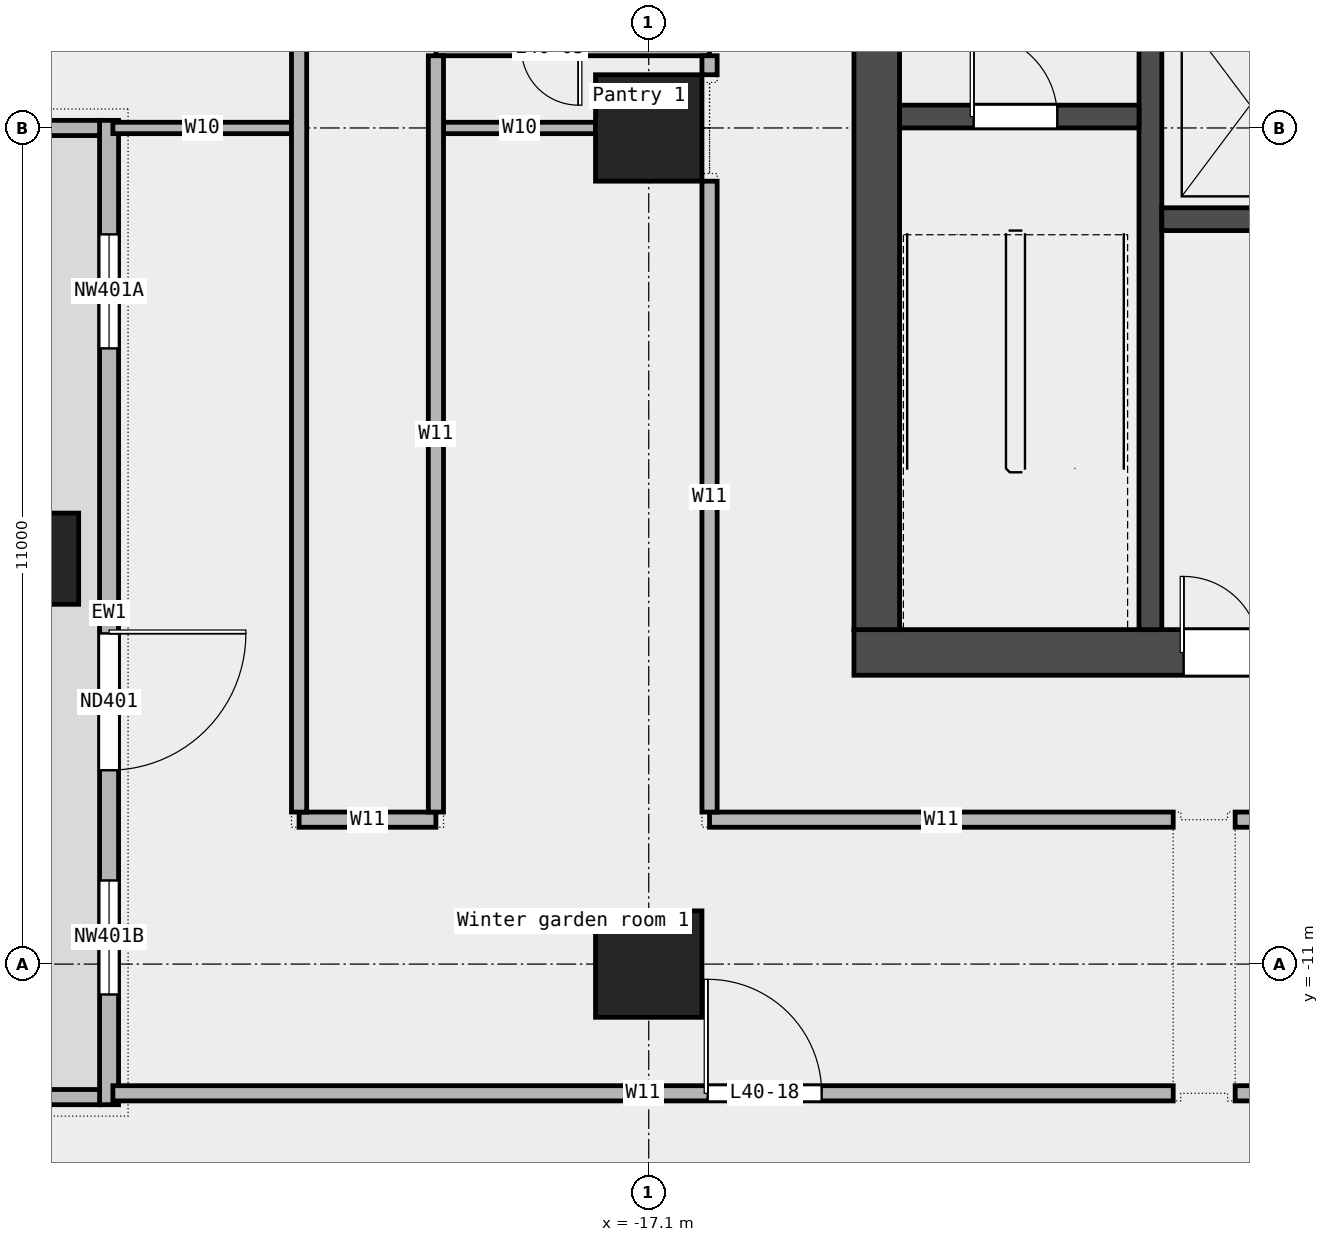
"""IFC4 building model, lengths in metres.
Left out: names, types, materials, properties, quantities, classifications, styles, units other than length and angle.
Written with IfcOpenShell. Run it as: python <this file> out.ifc"""

import sys

from ifc_helpers import new_model, si_unit, direction, frame, frame_2d, origin, origin_2d, place, context, subcontext, project, spatial, rectangle, extrude, element, fill, save


model = new_model("IFC4")
c1 = context("Model", 3, precision=1e-05, world=origin(), true_north=direction((0.0, 1.0)))
c2 = subcontext(c1, "Body", "Model", "MODEL_VIEW")
j1 = project(units=[si_unit("LENGTHUNIT", "METRE"), si_unit("PLANEANGLEUNIT", "RADIAN")], contexts=[c1])
p1 = place(None, origin())
s1 = spatial("IfcSite", under=j1, at=p1, CompositionType="ELEMENT")
p2 = place(p1, origin())
s2 = spatial("IfcBuilding", under=s1, at=p2, CompositionType="ELEMENT")
p3 = place(p2, frame((0.0, 0.0, 193.0)))
s3 = spatial("IfcBuildingStorey", under=s2, at=p3, CompositionType="ELEMENT", Elevation=193.0)
p4 = place(p3, frame((-25.2, -5.667, 0.0), z_axis=(0.0, 0.0, 1.0), x_axis=(1.0, 0.0, 0.0)))
e1 = element("IfcColumn", 1, at=p4, inside=s3, PredefinedType="COLUMN", context=c2, shape_type="SweptSolid", body=[
    extrude(rectangle(XDim=1.2, YDim=1.2, at=origin_2d()), origin(), (0.0, 0.0, 1.0), 3.6),
])
for number, where, z_axis, x_axis in (
    (2, (-17.1, -11.0, 0.0), (0.0, 0.0, 1.0), (1.0, 0.0, 0.0)),
    (3, (-17.1, 0.0, 0.0), (0.0, 0.0, 1.0), (1.0, 0.0, 0.0)),
):
    element("IfcColumn", number, at=place(p3, frame(where, z_axis=z_axis, x_axis=x_axis)), inside=s3, PredefinedType="COLUMN", context=c2, shape_type="SweptSolid", body=[
        extrude(rectangle(XDim=1.4, YDim=1.4, at=origin_2d()), origin(), (0.0, 0.0, 1.0), 3.6),
    ])
p5 = place(p3, frame((-24.2, 0.1, 0.0), z_axis=(0.0, 0.0, 1.0), x_axis=(0.0, -1.0, 0.0)))
e4 = element("IfcWall", 4, at=p5, inside=s3, PredefinedType="STANDARD", context=c2, shape_type="SweptSolid", body=[
    extrude(rectangle(XDim=12.95, YDim=0.25, at=frame_2d((6.475, 0.0))), origin(), (0.0, 0.0, 1.0), 3.6),
])
p6 = place(p5, frame((1.5, 0.0, 0.45)))
e5 = element("IfcOpeningElement", 5, at=p6, cuts=e4, PredefinedType="OPENING", context=c2, shape_type="SweptSolid", body=[
    extrude(rectangle(XDim=1.5, YDim=2.4, at=frame_2d((0.75, 1.2))), frame((0.0, 0.137, 0.0), z_axis=(0.0, -1.0, 0.0), x_axis=(1.0, 0.0, 0.0)), (0.0, 0.0, 1.0), 0.274),
])
p7 = place(p5, frame((6.75, 0.0, 0.0)))
e6 = element("IfcOpeningElement", 6, at=p7, cuts=e4, PredefinedType="OPENING", context=c2, shape_type="SweptSolid", body=[
    extrude(rectangle(XDim=1.8, YDim=2.4, at=frame_2d((0.9, 1.2))), frame((0.0, 0.137, 0.0), z_axis=(0.0, -1.0, 0.0), x_axis=(1.0, 0.0, 0.0)), (0.0, 0.0, 1.0), 0.274),
])
p8 = place(p5, frame((10.0, 0.0, 0.45)))
e7 = element("IfcOpeningElement", 7, at=p8, cuts=e4, PredefinedType="OPENING", context=c2, shape_type="SweptSolid", body=[
    extrude(rectangle(XDim=1.5, YDim=2.4, at=frame_2d((0.75, 1.2))), frame((0.0, 0.137, 0.0), z_axis=(0.0, -1.0, 0.0), x_axis=(1.0, 0.0, 0.0)), (0.0, 0.0, 1.0), 0.274),
])
for number, where, z_axis, x_axis in (
    (8, (-26.2, 0.0, 0.0), (0.0, 0.0, 1.0), (1.0, 0.0, 0.0)),
    (9, (-26.2, -12.75, 0.0), (0.0, 0.0, 1.0), (1.0, 0.0, 0.0)),
):
    element("IfcWall", number, at=place(p3, frame(where, z_axis=z_axis, x_axis=x_axis)), inside=s3, PredefinedType="STANDARD", context=c2, shape_type="SweptSolid", body=[
        extrude(rectangle(XDim=1.875, YDim=0.2, at=frame_2d((0.938, 0.0))), origin(), (0.0, 0.0, 1.0), 3.6),
    ])
p9 = place(p3, frame((-24.15, -12.7, 0.0), z_axis=(0.0, 0.0, 1.0), x_axis=(1.0, 0.0, 0.0)))
e10 = element("IfcWall", 10, at=p9, inside=s3, PredefinedType="PARTITIONING", context=c2, shape_type="SweptSolid", body=[
    extrude(rectangle(XDim=13.95, YDim=0.2, at=frame_2d((6.975, 0.0))), origin(), (0.0, 0.0, 1.0), 3.6),
])
p10 = place(p9, frame((7.825, 0.0, 0.0)))
e11 = element("IfcOpeningElement", 11, at=p10, cuts=e10, PredefinedType="OPENING", context=c2, shape_type="SweptSolid", body=[
    extrude(rectangle(XDim=1.5, YDim=2.1, at=frame_2d((0.75, 1.05))), frame((0.0, 0.112, 0.0), z_axis=(0.0, -1.0, 0.0), x_axis=(1.0, 0.0, 0.0)), (0.0, 0.0, 1.0), 0.224),
])
p11 = place(p3, frame((-9.385, -12.7, 0.0), z_axis=(0.0, 0.0, 1.0), x_axis=(1.0, 0.0, 0.0)))
e12 = element("IfcWall", 12, at=p11, inside=s3, PredefinedType="PARTITIONING", context=c2, shape_type="SweptSolid", body=[
    extrude(rectangle(XDim=12.425, YDim=0.2, at=frame_2d((6.212, 0.0))), origin(), (0.0, 0.0, 1.0), 3.6),
])
p12 = place(p3, frame((-21.7, -9.1, 0.0), z_axis=(0.0, 0.0, 1.0), x_axis=(1.0, 0.0, 0.0)))
e13 = element("IfcWall", 13, at=p12, inside=s3, PredefinedType="PARTITIONING", context=c2, shape_type="SweptSolid", body=[
    extrude(rectangle(XDim=1.8, YDim=0.2, at=frame_2d((0.9, 0.0))), origin(), (0.0, 0.0, 1.0), 3.6),
])
p13 = place(p3, frame((-16.3, -9.1, 0.0), z_axis=(0.0, 0.0, 1.0), x_axis=(1.0, 0.0, 0.0)))
e14 = element("IfcWall", 14, at=p13, inside=s3, PredefinedType="PARTITIONING", context=c2, shape_type="SweptSolid", body=[
    extrude(rectangle(XDim=6.1, YDim=0.2, at=frame_2d((3.05, 0.0))), origin(), (0.0, 0.0, 1.0), 3.6),
])
p14 = place(p3, frame((-9.385, -9.1, 0.0), z_axis=(0.0, 0.0, 1.0), x_axis=(1.0, 0.0, 0.0)))
e15 = element("IfcWall", 15, at=p14, inside=s3, PredefinedType="PARTITIONING", context=c2, shape_type="SweptSolid", body=[
    extrude(rectangle(XDim=12.425, YDim=0.2, at=frame_2d((6.212, 0.0))), origin(), (0.0, 0.0, 1.0), 3.6),
])
p15 = place(p14, frame((5.762, 0.0, 0.0)))
e16 = element("IfcOpeningElement", 16, at=p15, cuts=e15, PredefinedType="OPENING", context=c2, shape_type="SweptSolid", body=[
    extrude(rectangle(XDim=0.9, YDim=2.1, at=frame_2d((0.45, 1.05))), frame((0.0, 0.112, 0.0), z_axis=(0.0, -1.0, 0.0), x_axis=(1.0, 0.0, 0.0)), (0.0, 0.0, 1.0), 0.224),
])
p16 = place(p3, frame((-24.15, 0.0, 0.0), z_axis=(0.0, 0.0, 1.0), x_axis=(1.0, 0.0, 0.0)))
e17 = element("IfcWall", 17, at=p16, inside=s3, PredefinedType="PARTITIONING", context=c2, shape_type="SweptSolid", body=[
    extrude(rectangle(XDim=2.35, YDim=0.15, at=frame_2d((1.175, 0.0))), origin(), (0.0, 0.0, 1.0), 3.6),
])
p17 = place(p3, frame((-19.8, 0.0, 0.0), z_axis=(0.0, 0.0, 1.0), x_axis=(1.0, 0.0, 0.0)))
e18 = element("IfcWall", 18, at=p17, inside=s3, PredefinedType="PARTITIONING", context=c2, shape_type="SweptSolid", body=[
    extrude(rectangle(XDim=2.0, YDim=0.15, at=frame_2d((1.0, 0.0))), origin(), (0.0, 0.0, 1.0), 3.6),
])
p18 = place(p3, frame((-19.9, 1.05, 0.0), z_axis=(0.0, 0.0, 1.0), x_axis=(1.0, 0.0, 0.0)))
e19 = element("IfcWall", 19, at=p18, inside=s3, PredefinedType="PARTITIONING", context=c2, shape_type="SweptSolid", body=[
    extrude(rectangle(XDim=3.6, YDim=0.2, at=frame_2d((1.8, 0.0))), origin(), (0.0, 0.0, 1.0), 3.6),
])
p19 = place(p18, frame((1.125, 0.0, 0.0)))
e20 = element("IfcOpeningElement", 20, at=p19, cuts=e19, PredefinedType="OPENING", context=c2, shape_type="SweptSolid", body=[
    extrude(rectangle(XDim=0.75, YDim=2.1, at=frame_2d((0.375, 1.05))), frame((0.0, 0.112, 0.0), z_axis=(0.0, -1.0, 0.0), x_axis=(1.0, 0.0, 0.0)), (0.0, 0.0, 1.0), 0.224),
])
p20 = place(p3, frame((-21.7, -9.0, 0.0), z_axis=(0.0, 0.0, 1.0), x_axis=(0.0, 1.0, 0.0)))
e21 = element("IfcWall", 21, at=p20, inside=s3, PredefinedType="PARTITIONING", context=c2, shape_type="SweptSolid", body=[
    extrude(rectangle(XDim=24.3, YDim=0.2, at=frame_2d((12.15, 0.0))), origin(), (0.0, 0.0, 1.0), 3.6),
])
p21 = place(p20, frame((18.305, 0.0, 0.0)))
e22 = element("IfcOpeningElement", 22, at=p21, cuts=e21, PredefinedType="OPENING", context=c2, shape_type="SweptSolid", body=[
    extrude(rectangle(XDim=1.2, YDim=2.1, at=frame_2d((0.6, 1.05))), frame((0.0, 0.112, 0.0), z_axis=(0.0, -1.0, 0.0), x_axis=(1.0, 0.0, 0.0)), (0.0, 0.0, 1.0), 0.224),
])
p22 = place(p20, frame((10.805, 0.0, 0.0)))
e23 = element("IfcOpeningElement", 23, at=p22, cuts=e21, PredefinedType="OPENING", context=c2, shape_type="SweptSolid", body=[
    extrude(rectangle(XDim=0.9, YDim=2.1, at=frame_2d((0.45, 1.05))), frame((0.0, 0.112, 0.0), z_axis=(0.0, -1.0, 0.0), x_axis=(1.0, 0.0, 0.0)), (0.0, 0.0, 1.0), 0.224),
])
p23 = place(p3, frame((-19.9, -9.0, 0.0), z_axis=(0.0, 0.0, 1.0), x_axis=(0.0, 1.0, 0.0)))
e24 = element("IfcWall", 24, at=p23, inside=s3, PredefinedType="PARTITIONING", context=c2, shape_type="SweptSolid", body=[
    extrude(rectangle(XDim=9.95, YDim=0.2, at=frame_2d((4.975, 0.0))), origin(), (0.0, 0.0, 1.0), 3.6),
])
p24 = place(p3, frame((-16.3, -9.0, 0.0), z_axis=(0.0, 0.0, 1.0), x_axis=(0.0, 1.0, 0.0)))
e25 = element("IfcWall", 25, at=p24, inside=s3, PredefinedType="PARTITIONING", context=c2, shape_type="SweptSolid", body=[
    extrude(rectangle(XDim=8.3, YDim=0.2, at=frame_2d((4.15, 0.0))), origin(), (0.0, 0.0, 1.0), 3.6),
])
p25 = place(p3, frame((-16.3, 0.7, 0.0), z_axis=(0.0, 0.0, 1.0), x_axis=(0.0, 1.0, 0.0)))
e26 = element("IfcWall", 26, at=p25, inside=s3, PredefinedType="PARTITIONING", context=c2, shape_type="SweptSolid", body=[
    extrude(rectangle(XDim=0.25, YDim=0.2, at=frame_2d((0.125, 0.0))), origin(), (0.0, 0.0, 1.0), 3.6),
])
p26 = place(p3, frame((-14.4, -6.9, 0.0), z_axis=(0.0, 0.0, 1.0), x_axis=(1.0, 0.0, 0.0)))
e27 = element("IfcWall", 27, at=p26, inside=s3, PredefinedType="SHEAR", context=c2, shape_type="SweptSolid", body=[
    extrude(rectangle(XDim=28.8, YDim=0.6, at=frame_2d((14.4, 0.0))), origin(), (0.0, 0.0, 1.0), 3.7),
])
p27 = place(p26, frame((4.337, 0.0, 0.0)))
e28 = element("IfcOpeningElement", 28, at=p27, cuts=e27, PredefinedType="OPENING", context=c2, shape_type="SweptSolid", body=[
    extrude(rectangle(XDim=1.0, YDim=2.1, at=frame_2d((0.5, 1.05))), frame((0.0, 0.312, 0.0), z_axis=(0.0, -1.0, 0.0), x_axis=(1.0, 0.0, 0.0)), (0.0, 0.0, 1.0), 0.624),
])
p28 = place(p26, frame((6.212, 0.0, 0.0)))
e29 = element("IfcOpeningElement", 29, at=p28, cuts=e27, PredefinedType="OPENING", context=c2, shape_type="SweptSolid", body=[
    extrude(rectangle(XDim=1.0, YDim=2.1, at=frame_2d((0.5, 1.05))), frame((0.0, 0.312, 0.0), z_axis=(0.0, -1.0, 0.0), x_axis=(1.0, 0.0, 0.0)), (0.0, 0.0, 1.0), 0.624),
])
p29 = place(p26, frame((8.462, 0.0, 0.0)))
e30 = element("IfcOpeningElement", 30, at=p29, cuts=e27, PredefinedType="OPENING", context=c2, shape_type="SweptSolid", body=[
    extrude(rectangle(XDim=1.0, YDim=2.1, at=frame_2d((0.5, 1.05))), frame((0.0, 0.312, 0.0), z_axis=(0.0, -1.0, 0.0), x_axis=(1.0, 0.0, 0.0)), (0.0, 0.0, 1.0), 0.624),
])
p30 = place(p26, frame((13.05, 0.0, 0.0)))
e31 = element("IfcOpeningElement", 31, at=p30, cuts=e27, PredefinedType="OPENING", context=c2, shape_type="SweptSolid", body=[
    extrude(rectangle(XDim=1.2, YDim=2.1, at=frame_2d((0.6, 1.05))), frame((0.0, 0.312, 0.0), z_axis=(0.0, -1.0, 0.0), x_axis=(1.0, 0.0, 0.0)), (0.0, 0.0, 1.0), 0.624),
])
p31 = place(p26, frame((18.75, 0.0, 0.0)))
e32 = element("IfcOpeningElement", 32, at=p31, cuts=e27, PredefinedType="OPENING", context=c2, shape_type="SweptSolid", body=[
    extrude(rectangle(XDim=1.8, YDim=2.1, at=frame_2d((0.9, 1.05))), frame((0.0, 0.312, 0.0), z_axis=(0.0, -1.0, 0.0), x_axis=(1.0, 0.0, 0.0)), (0.0, 0.0, 1.0), 0.624),
])
p32 = place(p26, frame((23.087, 0.0, 0.0)))
e33 = element("IfcOpeningElement", 33, at=p32, cuts=e27, PredefinedType="OPENING", context=c2, shape_type="SweptSolid", body=[
    extrude(rectangle(XDim=1.0, YDim=2.1, at=frame_2d((0.5, 1.05))), frame((0.0, 0.312, 0.0), z_axis=(0.0, -1.0, 0.0), x_axis=(1.0, 0.0, 0.0)), (0.0, 0.0, 1.0), 0.624),
])
p33 = place(p3, frame((-14.1, -6.6, 0.0), z_axis=(0.0, 0.0, 1.0), x_axis=(0.0, 1.0, 0.0)))
e34 = element("IfcWall", 34, at=p33, inside=s3, PredefinedType="SHEAR", context=c2, shape_type="SweptSolid", body=[
    extrude(rectangle(XDim=19.5, YDim=0.6, at=frame_2d((9.75, 0.0))), origin(), (0.0, 0.0, 1.0), 3.7),
])
p34 = place(p33, frame((9.3, 0.0, 0.0)))
e35 = element("IfcOpeningElement", 35, at=p34, cuts=e34, PredefinedType="OPENING", context=c2, shape_type="SweptSolid", body=[
    extrude(rectangle(XDim=1.8, YDim=2.1, at=frame_2d((0.9, 1.05))), frame((0.0, 0.312, 0.0), z_axis=(0.0, -1.0, 0.0), x_axis=(1.0, 0.0, 0.0)), (0.0, 0.0, 1.0), 0.624),
])
p35 = place(p3, frame((-10.5, -6.6, 0.0), z_axis=(0.0, 0.0, 1.0), x_axis=(0.0, 1.0, 0.0)))
e36 = element("IfcWall", 36, at=p35, inside=s3, PredefinedType="SHEAR", context=c2, shape_type="SweptSolid", body=[
    extrude(rectangle(XDim=8.55, YDim=0.3, at=frame_2d((4.275, 0.0))), origin(), (0.0, 0.0, 1.0), 3.7),
])
p36 = place(p3, frame((-13.8, 0.15, 0.0), z_axis=(0.0, 0.0, 1.0), x_axis=(1.0, 0.0, 0.0)))
e37 = element("IfcWall", 37, at=p36, inside=s3, PredefinedType="SOLIDWALL", context=c2, shape_type="SweptSolid", body=[
    extrude(rectangle(XDim=3.15, YDim=0.3, at=frame_2d((1.575, 0.0))), origin(), (0.0, 0.0, 1.0), 3.7),
])
p37 = place(p36, frame((0.975, 0.0, 0.0)))
e38 = element("IfcOpeningElement", 38, at=p37, cuts=e37, PredefinedType="OPENING", context=c2, shape_type="SweptSolid", body=[
    extrude(rectangle(XDim=1.1, YDim=2.1, at=frame_2d((0.55, 1.05))), frame((0.0, 0.162, 0.0), z_axis=(0.0, -1.0, 0.0), x_axis=(1.0, 0.0, 0.0)), (0.0, 0.0, 1.0), 0.324),
])
p38 = place(p3, frame((-10.35, -1.2, 0.0), z_axis=(0.0, 0.0, 1.0), x_axis=(1.0, 0.0, 0.0)))
e39 = element("IfcWall", 39, at=p38, inside=s3, PredefinedType="SOLIDWALL", context=c2, shape_type="SweptSolid", body=[
    extrude(rectangle(XDim=20.7, YDim=0.3, at=frame_2d((10.35, 0.0))), origin(), (0.0, 0.0, 1.0), 3.7),
])
p39 = place(p6, origin())
e40 = element("IfcWindow", 40, at=p39, inside=s3, PartitioningType="SINGLE_PANEL", PredefinedType="WINDOW", context=c2, shape_type="SweptSolid", body=[
    extrude(rectangle(XDim=1.5, YDim=2.4, at=frame_2d((0.75, 1.2))), frame((0.0, 0.03, 0.0), z_axis=(0.0, -1.0, 0.0), x_axis=(1.0, 0.0, 0.0)), (0.0, 0.0, 1.0), 0.06),
])
fill(e5, e40)
p40 = place(p7, origin())
e41 = element("IfcDoor", 41, at=p40, inside=s3, OperationType="DOUBLE_DOOR_SINGLE_SWING", PredefinedType="DOOR", context=c2, shape_type="SweptSolid", body=[
    extrude(rectangle(XDim=1.8, YDim=2.4, at=frame_2d((0.9, 1.2))), frame((0.0, 0.025, 0.0), z_axis=(0.0, -1.0, 0.0), x_axis=(1.0, 0.0, 0.0)), (0.0, 0.0, 1.0), 0.05),
])
fill(e6, e41)
p41 = place(p8, origin())
e42 = element("IfcWindow", 42, at=p41, inside=s3, PartitioningType="SINGLE_PANEL", PredefinedType="WINDOW", context=c2, shape_type="SweptSolid", body=[
    extrude(rectangle(XDim=1.5, YDim=2.4, at=frame_2d((0.75, 1.2))), frame((0.0, 0.03, 0.0), z_axis=(0.0, -1.0, 0.0), x_axis=(1.0, 0.0, 0.0)), (0.0, 0.0, 1.0), 0.06),
])
fill(e7, e42)
p42 = place(p10, origin())
e43 = element("IfcDoor", 43, at=p42, inside=s3, OperationType="DOUBLE_DOOR_SINGLE_SWING", PredefinedType="DOOR", context=c2, shape_type="SweptSolid", body=[
    extrude(rectangle(XDim=1.5, YDim=2.1, at=frame_2d((0.75, 1.05))), frame((0.0, 0.025, 0.0), z_axis=(0.0, -1.0, 0.0), x_axis=(1.0, 0.0, 0.0)), (0.0, 0.0, 1.0), 0.05),
])
fill(e11, e43)
p43 = place(p37, origin())
e44 = element("IfcDoor", 44, at=p43, inside=s3, OperationType="SINGLE_SWING_LEFT", PredefinedType="DOOR", context=c2, shape_type="SweptSolid", body=[
    extrude(rectangle(XDim=1.1, YDim=2.1, at=frame_2d((0.55, 1.05))), frame((0.0, 0.025, 0.0), z_axis=(0.0, -1.0, 0.0), x_axis=(1.0, 0.0, 0.0)), (0.0, 0.0, 1.0), 0.05),
])
fill(e38, e44)
p44 = place(p27, origin())
e45 = element("IfcDoor", 45, at=p44, inside=s3, OperationType="SINGLE_SWING_LEFT", PredefinedType="DOOR", context=c2, shape_type="SweptSolid", body=[
    extrude(rectangle(XDim=1.0, YDim=2.1, at=frame_2d((0.5, 1.05))), frame((0.0, 0.025, 0.0), z_axis=(0.0, -1.0, 0.0), x_axis=(1.0, 0.0, 0.0)), (0.0, 0.0, 1.0), 0.05),
])
fill(e28, e45)
save(model, sys.argv[1])
